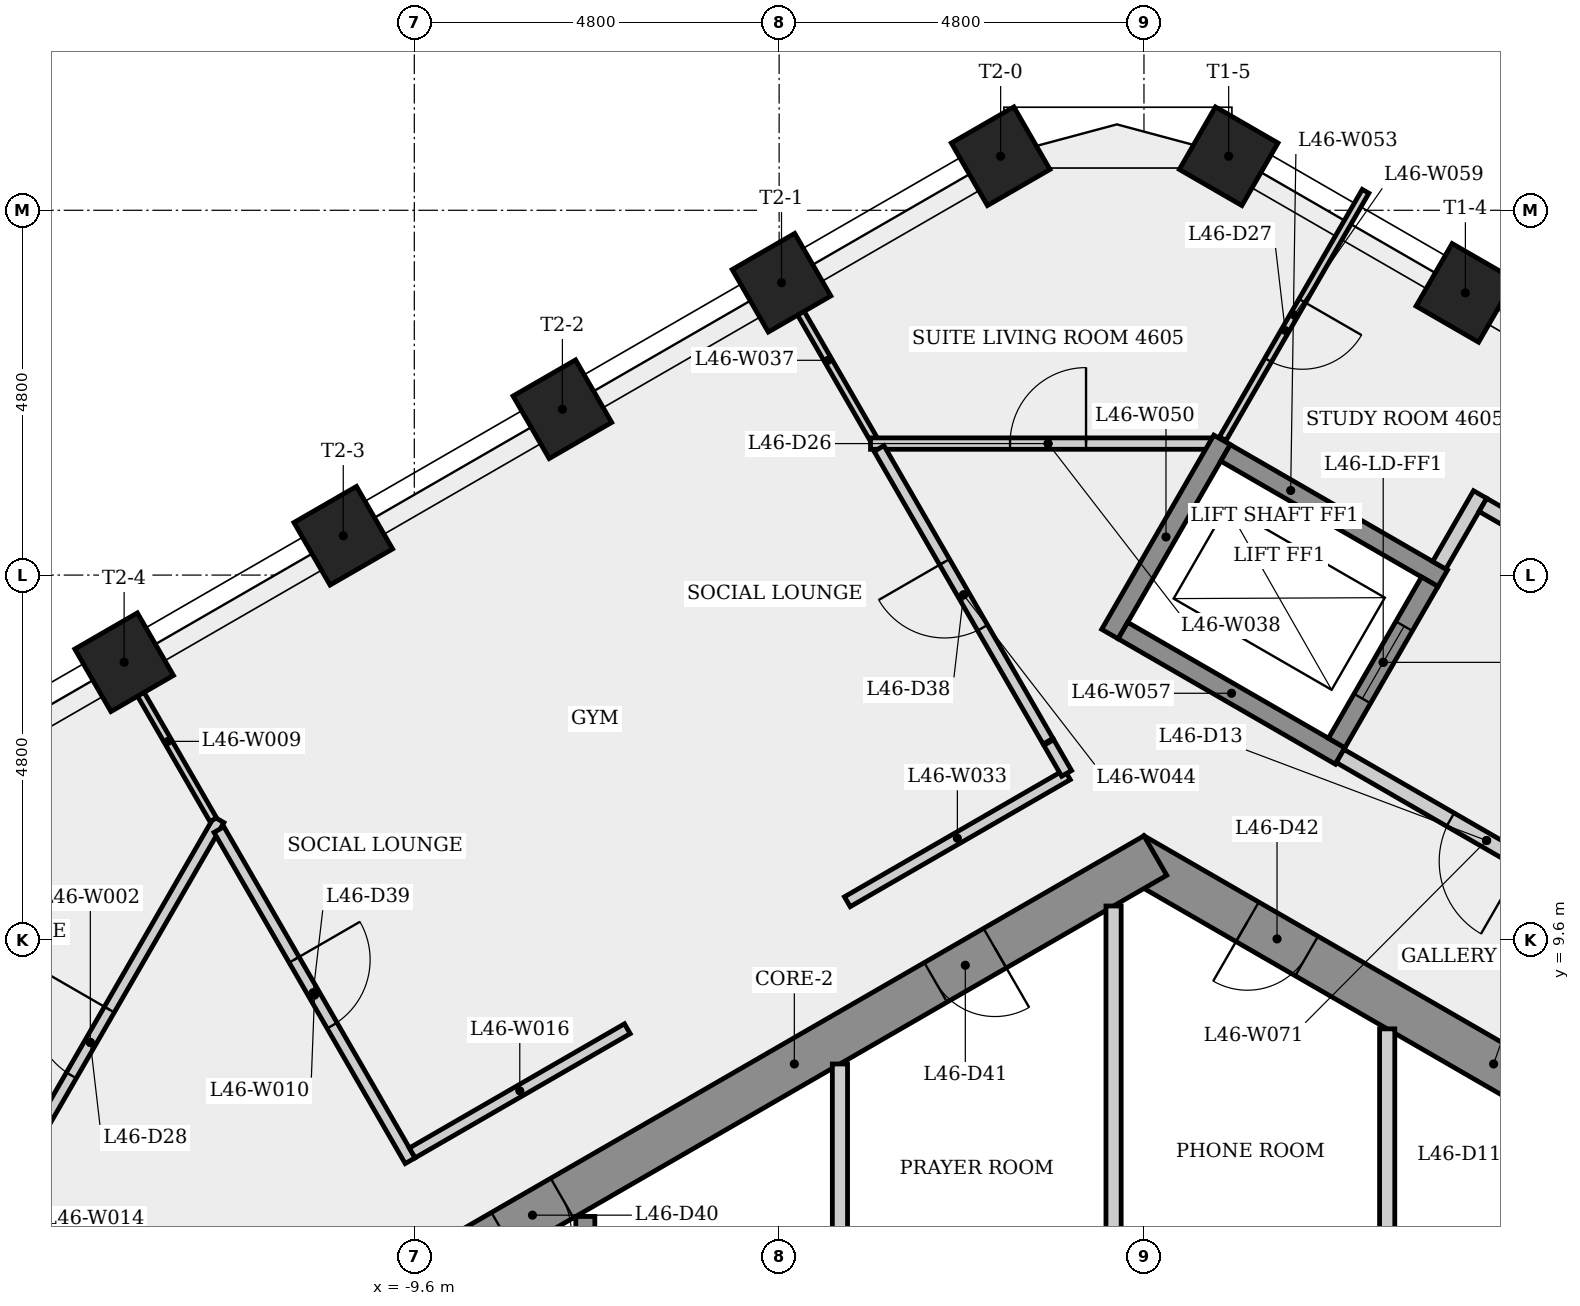
"""IFC4 building model, lengths in metres.
Left out: names, types, materials, properties, quantities, classifications, styles, units other than length and angle.
Written with IfcOpenShell. Run it as: python <this file> out.ifc"""

import sys

from ifc_helpers import new_model, si_unit, direction, frame, frame_2d, origin, origin_2d, place, context, subcontext, project, spatial, rectangle, extrude, element, fill, save


model = new_model("IFC4")
c1 = context("Model", 3, precision=1e-05, world=origin(), true_north=direction((0.0, 1.0)))
c2 = subcontext(c1, "Body", "Model", "MODEL_VIEW")
j1 = project(units=[si_unit("LENGTHUNIT", "METRE"), si_unit("PLANEANGLEUNIT", "RADIAN")], contexts=[c1])
p1 = place(None, origin())
s1 = spatial("IfcSite", under=j1, at=p1, CompositionType="ELEMENT")
p2 = place(p1, origin())
s2 = spatial("IfcBuilding", under=s1, at=p2, CompositionType="ELEMENT")
p3 = place(p2, frame((0.0, 0.0, 173.1)))
s3 = spatial("IfcBuildingStorey", under=s2, at=p3, CompositionType="ELEMENT", Elevation=173.1)
p4 = place(p3, frame((9.35, 5.225, 0.0), z_axis=(0.0, 0.0, 1.0), x_axis=(-0.866023993627, 0.500002442456, 0.0)))
e1 = element("IfcWall", 1, at=p4, inside=s3, PredefinedType="SHEAR", context=c2, shape_type="SweptSolid", body=[
    extrude(rectangle(XDim=10.97, YDim=0.6, at=frame_2d((5.485, 0.0))), origin(), (0.0, 0.0, 1.0), 3.4),
])
p5 = place(p4, frame((8.325, 0.0, 0.0)))
e2 = element("IfcOpeningElement", 2, at=p5, cuts=e1, PredefinedType="OPENING", context=c2, shape_type="SweptSolid", body=[
    extrude(rectangle(XDim=0.9, YDim=2.1, at=frame_2d((0.45, 1.05))), frame((0.0, 0.31, 0.0), z_axis=(0.0, -1.0, 0.0), x_axis=(1.0, 0.0, 0.0)), (0.0, 0.0, 1.0), 0.62),
])
p6 = place(p4, frame((1.518, 0.0, 0.0)))
e3 = element("IfcOpeningElement", 3, at=p6, cuts=e1, PredefinedType="OPENING", context=c2, shape_type="SweptSolid", body=[
    extrude(rectangle(XDim=0.9, YDim=2.1, at=frame_2d((0.45, 1.05))), frame((0.0, 0.31, 0.0), z_axis=(0.0, -1.0, 0.0), x_axis=(1.0, 0.0, 0.0)), (0.0, 0.0, 1.0), 0.62),
])
p7 = place(p3, frame((0.15, 10.71, 0.0), z_axis=(0.0, 0.0, 1.0), x_axis=(-0.866023993627, -0.500002442456, 0.0)))
e4 = element("IfcWall", 4, at=p7, inside=s3, PredefinedType="SHEAR", context=c2, shape_type="SweptSolid", body=[
    extrude(rectangle(XDim=10.97, YDim=0.6, at=frame_2d((5.485, 0.0))), origin(), (0.0, 0.0, 1.0), 3.4),
])
p8 = place(p7, frame((9.013, 0.0, 0.0)))
e5 = element("IfcOpeningElement", 5, at=p8, cuts=e4, PredefinedType="OPENING", context=c2, shape_type="SweptSolid", body=[
    extrude(rectangle(XDim=0.9, YDim=2.1, at=frame_2d((0.45, 1.05))), frame((0.0, 0.31, 0.0), z_axis=(0.0, -1.0, 0.0), x_axis=(1.0, 0.0, 0.0)), (0.0, 0.0, 1.0), 0.62),
])
p9 = place(p7, frame((2.437, 0.0, 0.0)))
e6 = element("IfcOpeningElement", 6, at=p9, cuts=e4, PredefinedType="OPENING", context=c2, shape_type="SweptSolid", body=[
    extrude(rectangle(XDim=0.9, YDim=2.1, at=frame_2d((0.45, 1.05))), frame((0.0, 0.31, 0.0), z_axis=(0.0, -1.0, 0.0), x_axis=(1.0, 0.0, 0.0)), (0.0, 0.0, 1.0), 0.62),
])
for number, where, z_axis, x_axis in (
    (7, (4.229, 18.113, 0.0), (0.0, 0.0, 1.0), (0.5, 0.866, 0.0)),
    (8, (1.114, 19.911, 0.0), (0.0, 0.0, 1.0), (0.5, 0.866, 0.0)),
    (9, (-1.886, 19.911, 0.0), (0.0, 0.0, 1.0), (-0.5, 0.866, 0.0)),
    (10, (-4.769, 18.247, 0.0), (0.0, 0.0, 1.0), (-0.5, 0.866, 0.0)),
    (11, (-7.652, 16.582, 0.0), (0.0, 0.0, 1.0), (-0.5, 0.866, 0.0)),
    (12, (-10.535, 14.918, 0.0), (0.0, 0.0, 1.0), (-0.5, 0.866, 0.0)),
    (13, (-13.418, 13.253, 0.0), (0.0, 0.0, 1.0), (-0.5, 0.866, 0.0)),
):
    element("IfcColumn", number, at=place(p3, frame(where, z_axis=z_axis, x_axis=x_axis)), inside=s3, PredefinedType="COLUMN", context=c2, shape_type="SweptSolid", body=[
        extrude(rectangle(XDim=0.95, YDim=0.95, at=origin_2d()), origin(), (0.0, 0.0, 1.0), 3.4),
    ])
p10 = place(p3, frame((-15.555, 5.319, 0.0), z_axis=(0.0, 0.0, 1.0), x_axis=(0.500006564844, 0.866021613537, 0.0)))
e14 = element("IfcWall", 14, at=p10, inside=s3, PredefinedType="PARTITIONING", context=c2, shape_type="SweptSolid", body=[
    extrude(rectangle(XDim=6.769, YDim=0.15, at=frame_2d((3.385, 0.0))), origin(), (0.0, 0.0, 1.0), 3.05),
])
p11 = place(p10, frame((2.885, 0.0, 0.0)))
e15 = element("IfcOpeningElement", 15, at=p11, cuts=e14, PredefinedType="OPENING", context=c2, shape_type="SweptSolid", body=[
    extrude(rectangle(XDim=1.0, YDim=2.1, at=frame_2d((0.5, 1.05))), frame((0.0, 0.085, 0.0), z_axis=(0.0, -1.0, 0.0), x_axis=(1.0, 0.0, 0.0)), (0.0, 0.0, 1.0), 0.17),
])
p12 = place(p3, frame((-13.436, 13.243, 0.0), z_axis=(0.0, 0.0, 1.0), x_axis=(0.500021302286, -0.866013104554, 0.0)))
e16 = element("IfcWall", 16, at=p12, inside=s3, PredefinedType="PARTITIONING", context=c2, shape_type="SweptSolid", body=[
    extrude(rectangle(XDim=2.381, YDim=0.1, at=frame_2d((1.19, 0.0))), origin(), (0.0, 0.0, 1.0), 3.05),
])
p13 = place(p3, frame((-12.17, 11.051, 0.0), z_axis=(0.0, 0.0, 1.0), x_axis=(0.500006713398, -0.866021527768, 0.0)))
e17 = element("IfcWall", 17, at=p13, inside=s3, PredefinedType="PARTITIONING", context=c2, shape_type="SweptSolid", body=[
    extrude(rectangle(XDim=5.031, YDim=0.15, at=frame_2d((2.515, 0.0))), origin(), (0.0, 0.0, 1.0), 3.05),
])
p14 = place(p13, frame((1.978, 0.0, 0.0)))
e18 = element("IfcOpeningElement", 18, at=p14, cuts=e17, PredefinedType="OPENING", context=c2, shape_type="SweptSolid", body=[
    extrude(rectangle(XDim=1.0, YDim=2.1, at=frame_2d((0.5, 1.05))), frame((0.0, 0.085, 0.0), z_axis=(0.0, -1.0, 0.0), x_axis=(1.0, 0.0, 0.0)), (0.0, 0.0, 1.0), 0.17),
])
p15 = place(p3, frame((-9.627, 6.797, 0.0), z_axis=(0.0, 0.0, 1.0), x_axis=(0.866013897511, 0.50001992892, 0.0)))
e19 = element("IfcWall", 19, at=p15, inside=s3, PredefinedType="PARTITIONING", context=c2, shape_type="SweptSolid", body=[
    extrude(rectangle(XDim=3.268, YDim=0.15, at=frame_2d((1.634, 0.0))), origin(), (0.0, 0.0, 1.0), 3.05),
])
p16 = place(p3, frame((-7.35, 1.925, 0.0), z_axis=(0.0, 0.0, 1.0), x_axis=(0.0, 1.0, 0.0)))
e20 = element("IfcWall", 20, at=p16, inside=s3, PredefinedType="SHEAR", context=c2, shape_type="SweptSolid", body=[
    extrude(rectangle(XDim=4.036, YDim=0.25, at=frame_2d((2.018, 0.0))), origin(), (0.0, 0.0, 1.0), 3.05),
])
p17 = place(p3, frame((-4.0, 7.967, 0.0), z_axis=(0.0, 0.0, 1.0), x_axis=(0.0, -1.0, 0.0)))
e21 = element("IfcWall", 21, at=p17, inside=s3, PredefinedType="PARTITIONING", context=c2, shape_type="SweptSolid", body=[
    extrude(rectangle(XDim=2.692, YDim=0.2, at=frame_2d((1.346, 0.0))), origin(), (0.0, 0.0, 1.0), 3.05),
])
p18 = place(p3, frame((-3.903, 10.102, 0.0), z_axis=(0.0, 0.0, 1.0), x_axis=(0.866000720478, 0.500042750305, 0.0)))
e22 = element("IfcWall", 22, at=p18, inside=s3, PredefinedType="PARTITIONING", context=c2, shape_type="SweptSolid", body=[
    extrude(rectangle(XDim=3.343, YDim=0.15, at=frame_2d((1.671, 0.0))), origin(), (0.0, 0.0, 1.0), 3.05),
])
p19 = place(p3, frame((-3.561, 16.195, 0.0), z_axis=(0.0, 0.0, 1.0), x_axis=(-0.500021302286, 0.866013104554, 0.0)))
e23 = element("IfcWall", 23, at=p19, inside=s3, PredefinedType="PARTITIONING", context=c2, shape_type="SweptSolid", body=[
    extrude(rectangle(XDim=2.381, YDim=0.1, at=frame_2d((1.19, 0.0))), origin(), (0.0, 0.0, 1.0), 3.05),
])
p20 = place(p3, frame((-3.598, 16.13, 0.0), z_axis=(0.0, 0.0, 1.0), x_axis=(1.0, 0.0, 0.0)))
e24 = element("IfcWall", 24, at=p20, inside=s3, PredefinedType="PARTITIONING", context=c2, shape_type="SweptSolid", body=[
    extrude(rectangle(XDim=4.672, YDim=0.15, at=frame_2d((2.336, 0.0))), origin(), (0.0, 0.0, 1.0), 3.05),
])
p21 = place(p20, frame((1.836, 0.0, 0.0)))
e25 = element("IfcOpeningElement", 25, at=p21, cuts=e24, PredefinedType="OPENING", context=c2, shape_type="SweptSolid", body=[
    extrude(rectangle(XDim=1.0, YDim=2.1, at=frame_2d((0.5, 1.05))), frame((0.0, 0.085, 0.0), z_axis=(0.0, -1.0, 0.0), x_axis=(1.0, 0.0, 0.0)), (0.0, 0.0, 1.0), 0.17),
])
p22 = place(p3, frame((-1.262, 12.214, 0.0), z_axis=(0.0, 0.0, 1.0), x_axis=(-0.500012331591, 0.86601828402, 0.0)))
e26 = element("IfcWall", 26, at=p22, inside=s3, PredefinedType="PARTITIONING", context=c2, shape_type="SweptSolid", body=[
    extrude(rectangle(XDim=4.447, YDim=0.15, at=frame_2d((2.224, 0.0))), origin(), (0.0, 0.0, 1.0), 3.05),
])
p23 = place(p22, frame((1.723, 0.0, 0.0)))
e27 = element("IfcOpeningElement", 27, at=p23, cuts=e26, PredefinedType="OPENING", context=c2, shape_type="SweptSolid", body=[
    extrude(rectangle(XDim=1.0, YDim=2.1, at=frame_2d((0.5, 1.05))), frame((0.0, 0.085, 0.0), z_axis=(0.0, -1.0, 0.0), x_axis=(1.0, 0.0, 0.0)), (0.0, 0.0, 1.0), 0.17),
])
p24 = place(p3, frame((-1.252, 12.197, 0.0), z_axis=(0.0, 0.0, 1.0), x_axis=(0.499947857008, -0.866055506462, 0.0)))
e28 = element("IfcWall", 28, at=p24, inside=s3, PredefinedType="PARTITIONING", context=c2, shape_type="SweptSolid", body=[
    extrude(rectangle(XDim=0.469, YDim=0.15, at=frame_2d((0.234, 0.0))), origin(), (0.0, 0.0, 1.0), 3.05),
])
p25 = place(p3, frame((-0.4, 10.046, 0.0), z_axis=(0.0, 0.0, 1.0), x_axis=(0.0, -1.0, 0.0)))
e29 = element("IfcWall", 29, at=p25, inside=s3, PredefinedType="PARTITIONING", context=c2, shape_type="SweptSolid", body=[
    extrude(rectangle(XDim=4.771, YDim=0.2, at=frame_2d((2.385, 0.0))), origin(), (0.0, 0.0, 1.0), 3.05),
])
p26 = place(p3, frame((-0.448, 13.624, 0.0), z_axis=(0.0, 0.0, 1.0), x_axis=(0.500037662692, 0.866003658127, 0.0)))
e30 = element("IfcWall", 30, at=p26, inside=s3, PredefinedType="SHEAR", context=c2, shape_type="SweptSolid", body=[
    extrude(rectangle(XDim=2.95, YDim=0.25, at=frame_2d((1.475, 0.0))), origin(), (0.0, 0.0, 1.0), 3.05),
])
for number, where, z_axis, x_axis in (
    (31, (1.073, 16.008, 0.0), (0.0, 0.0, 1.0), (0.866, -0.5, 0.0)),
    (32, (2.581, 12.02, 0.0), (0.0, 0.0, 1.0), (-0.866, 0.5, 0.0)),
):
    element("IfcWall", number, at=place(p3, frame(where, z_axis=z_axis, x_axis=x_axis)), inside=s3, PredefinedType="SHEAR", context=c2, shape_type="SweptSolid", body=[
        extrude(rectangle(XDim=3.3, YDim=0.25, at=frame_2d((1.65, 0.0))), origin(), (0.0, 0.0, 1.0), 3.05),
    ])
p27 = place(p3, frame((2.535, 12.191, 0.0), z_axis=(0.0, 0.0, 1.0), x_axis=(0.500061746146, 0.865989751695, 0.0)))
e33 = element("IfcWall", 33, at=p27, inside=s3, PredefinedType="SHEAR", context=c2, shape_type="SweptSolid", body=[
    extrude(rectangle(XDim=2.45, YDim=0.25, at=frame_2d((1.225, 0.0))), origin(), (0.0, 0.0, 1.0), 3.4),
])
p28 = place(p27, frame((0.675, 0.0, 0.0)))
e34 = element("IfcOpeningElement", 34, at=p28, cuts=e33, PredefinedType="OPENING", context=c2, shape_type="SweptSolid", body=[
    extrude(rectangle(XDim=1.1, YDim=2.1, at=frame_2d((0.55, 1.05))), frame((0.0, 0.135, 0.0), z_axis=(0.0, -1.0, 0.0), x_axis=(1.0, 0.0, 0.0)), (0.0, 0.0, 1.0), 0.27),
])
p29 = place(p3, frame((2.915, 19.449, 0.0), z_axis=(0.0, 0.0, 1.0), x_axis=(-0.499975549825, -0.866039519639, 0.0)))
e35 = element("IfcWall", 35, at=p29, inside=s3, PredefinedType="PARTITIONING", context=c2, shape_type="SweptSolid", body=[
    extrude(rectangle(XDim=3.758, YDim=0.1, at=frame_2d((1.879, 0.0))), origin(), (0.0, 0.0, 1.0), 3.05),
])
p30 = place(p29, frame((1.664, 0.0, 0.0)))
e36 = element("IfcOpeningElement", 36, at=p30, cuts=e35, PredefinedType="OPENING", context=c2, shape_type="SweptSolid", body=[
    extrude(rectangle(XDim=0.9, YDim=2.1, at=frame_2d((0.45, 1.05))), frame((0.0, 0.06, 0.0), z_axis=(0.0, -1.0, 0.0), x_axis=(1.0, 0.0, 0.0)), (0.0, 0.0, 1.0), 0.12),
])
p31 = place(p3, frame((3.2, 8.429, 0.0), z_axis=(0.0, 0.0, 1.0), x_axis=(0.0, -1.0, 0.0)))
e37 = element("IfcWall", 37, at=p31, inside=s3, PredefinedType="PARTITIONING", context=c2, shape_type="SweptSolid", body=[
    extrude(rectangle(XDim=3.154, YDim=0.2, at=frame_2d((1.577, 0.0))), origin(), (0.0, 0.0, 1.0), 3.05),
])
p32 = place(p3, frame((3.885, 14.529, 0.0), z_axis=(0.0, 0.0, 1.0), x_axis=(0.499997628298, 0.866026773083, 0.0)))
e38 = element("IfcWall", 38, at=p32, inside=s3, PredefinedType="PARTITIONING", context=c2, shape_type="SweptSolid", body=[
    extrude(rectangle(XDim=1.075, YDim=0.2, at=frame_2d((0.538, 0.0))), origin(), (0.0, 0.0, 1.0), 3.05),
])
p33 = place(p3, frame((4.459, 15.323, 0.0), z_axis=(0.0, 0.0, 1.0), x_axis=(0.866016039709, -0.500016218704, 0.0)))
e39 = element("IfcWall", 39, at=p33, inside=s3, PredefinedType="PARTITIONING", context=c2, shape_type="SweptSolid", body=[
    extrude(rectangle(XDim=4.7, YDim=0.2, at=frame_2d((2.35, 0.0))), origin(), (0.0, 0.0, 1.0), 3.05),
])
p34 = place(p3, frame((6.435, 9.795, 0.0), z_axis=(0.0, 0.0, 1.0), x_axis=(-0.866012907634, 0.500021643343, 0.0)))
e40 = element("IfcWall", 40, at=p34, inside=s3, PredefinedType="PARTITIONING", context=c2, shape_type="SweptSolid", body=[
    extrude(rectangle(XDim=4.45, YDim=0.2, at=frame_2d((2.225, 0.0))), origin(), (0.0, 0.0, 1.0), 3.05),
])
p35 = place(p34, frame((1.675, 0.0, 0.0)))
e41 = element("IfcOpeningElement", 41, at=p35, cuts=e40, PredefinedType="OPENING", context=c2, shape_type="SweptSolid", body=[
    extrude(rectangle(XDim=1.1, YDim=2.1, at=frame_2d((0.55, 1.05))), frame((0.0, 0.11, 0.0), z_axis=(0.0, -1.0, 0.0), x_axis=(1.0, 0.0, 0.0)), (0.0, 0.0, 1.0), 0.22),
])
p36 = place(p35, origin())
e42 = element("IfcDoor", 42, at=p36, inside=s3, OperationType="SINGLE_SWING_LEFT", PredefinedType="DOOR", context=c2, shape_type="SweptSolid", body=[
    extrude(rectangle(XDim=1.1, YDim=2.1, at=frame_2d((0.55, 1.05))), frame((0.0, 0.025, 0.0), z_axis=(0.0, -1.0, 0.0), x_axis=(1.0, 0.0, 0.0)), (0.0, 0.0, 1.0), 0.05),
])
fill(e41, e42)
p37 = place(p28, origin())
e43 = element("IfcDoor", 43, at=p37, inside=s3, OperationType="SLIDING_TO_LEFT", PredefinedType="DOOR", context=c2, shape_type="SweptSolid", body=[
    extrude(rectangle(XDim=1.1, YDim=2.1, at=frame_2d((0.55, 1.05))), frame((0.0, 0.025, 0.0), z_axis=(0.0, -1.0, 0.0), x_axis=(1.0, 0.0, 0.0)), (0.0, 0.0, 1.0), 0.05),
])
fill(e34, e43)
p38 = place(p21, origin())
e44 = element("IfcDoor", 44, at=p38, inside=s3, OperationType="SINGLE_SWING_RIGHT", PredefinedType="DOOR", context=c2, shape_type="SweptSolid", body=[
    extrude(rectangle(XDim=1.0, YDim=2.1, at=frame_2d((0.5, 1.05))), frame((0.0, 0.025, 0.0), z_axis=(0.0, -1.0, 0.0), x_axis=(1.0, 0.0, 0.0)), (0.0, 0.0, 1.0), 0.05),
])
fill(e25, e44)
p39 = place(p30, origin())
e45 = element("IfcDoor", 45, at=p39, inside=s3, OperationType="SINGLE_SWING_LEFT", PredefinedType="DOOR", context=c2, shape_type="SweptSolid", body=[
    extrude(rectangle(XDim=0.9, YDim=2.1, at=frame_2d((0.45, 1.05))), frame((0.0, 0.025, 0.0), z_axis=(0.0, -1.0, 0.0), x_axis=(1.0, 0.0, 0.0)), (0.0, 0.0, 1.0), 0.05),
])
fill(e36, e45)
p40 = place(p11, origin())
e46 = element("IfcDoor", 46, at=p40, inside=s3, OperationType="SINGLE_SWING_RIGHT", PredefinedType="DOOR", context=c2, shape_type="SweptSolid", body=[
    extrude(rectangle(XDim=1.0, YDim=2.1, at=frame_2d((0.5, 1.05))), frame((0.0, 0.025, 0.0), z_axis=(0.0, -1.0, 0.0), x_axis=(1.0, 0.0, 0.0)), (0.0, 0.0, 1.0), 0.05),
])
fill(e15, e46)
p41 = place(p23, origin())
e47 = element("IfcDoor", 47, at=p41, inside=s3, OperationType="SINGLE_SWING_RIGHT", PredefinedType="DOOR", context=c2, shape_type="SweptSolid", body=[
    extrude(rectangle(XDim=1.0, YDim=2.1, at=frame_2d((0.5, 1.05))), frame((0.0, 0.025, 0.0), z_axis=(0.0, -1.0, 0.0), x_axis=(1.0, 0.0, 0.0)), (0.0, 0.0, 1.0), 0.05),
])
fill(e27, e47)
p42 = place(p14, origin())
e48 = element("IfcDoor", 48, at=p42, inside=s3, OperationType="SINGLE_SWING_LEFT", PredefinedType="DOOR", context=c2, shape_type="SweptSolid", body=[
    extrude(rectangle(XDim=1.0, YDim=2.1, at=frame_2d((0.5, 1.05))), frame((0.0, 0.025, 0.0), z_axis=(0.0, -1.0, 0.0), x_axis=(1.0, 0.0, 0.0)), (0.0, 0.0, 1.0), 0.05),
])
fill(e18, e48)
p43 = place(p8, origin())
e49 = element("IfcDoor", 49, at=p43, inside=s3, OperationType="SINGLE_SWING_RIGHT", PredefinedType="DOOR", context=c2, shape_type="SweptSolid", body=[
    extrude(rectangle(XDim=0.9, YDim=2.1, at=frame_2d((0.45, 1.05))), frame((0.0, 0.025, 0.0), z_axis=(0.0, -1.0, 0.0), x_axis=(1.0, 0.0, 0.0)), (0.0, 0.0, 1.0), 0.05),
])
fill(e5, e49)
p44 = place(p9, origin())
e50 = element("IfcDoor", 50, at=p44, inside=s3, OperationType="SINGLE_SWING_LEFT", PredefinedType="DOOR", context=c2, shape_type="SweptSolid", body=[
    extrude(rectangle(XDim=0.9, YDim=2.1, at=frame_2d((0.45, 1.05))), frame((0.0, 0.025, 0.0), z_axis=(0.0, -1.0, 0.0), x_axis=(1.0, 0.0, 0.0)), (0.0, 0.0, 1.0), 0.05),
])
fill(e6, e50)
p45 = place(p5, origin())
e51 = element("IfcDoor", 51, at=p45, inside=s3, OperationType="SINGLE_SWING_RIGHT", PredefinedType="DOOR", context=c2, shape_type="SweptSolid", body=[
    extrude(rectangle(XDim=0.9, YDim=2.1, at=frame_2d((0.45, 1.05))), frame((0.0, 0.025, 0.0), z_axis=(0.0, -1.0, 0.0), x_axis=(1.0, 0.0, 0.0)), (0.0, 0.0, 1.0), 0.05),
])
fill(e2, e51)
save(model, sys.argv[1])
